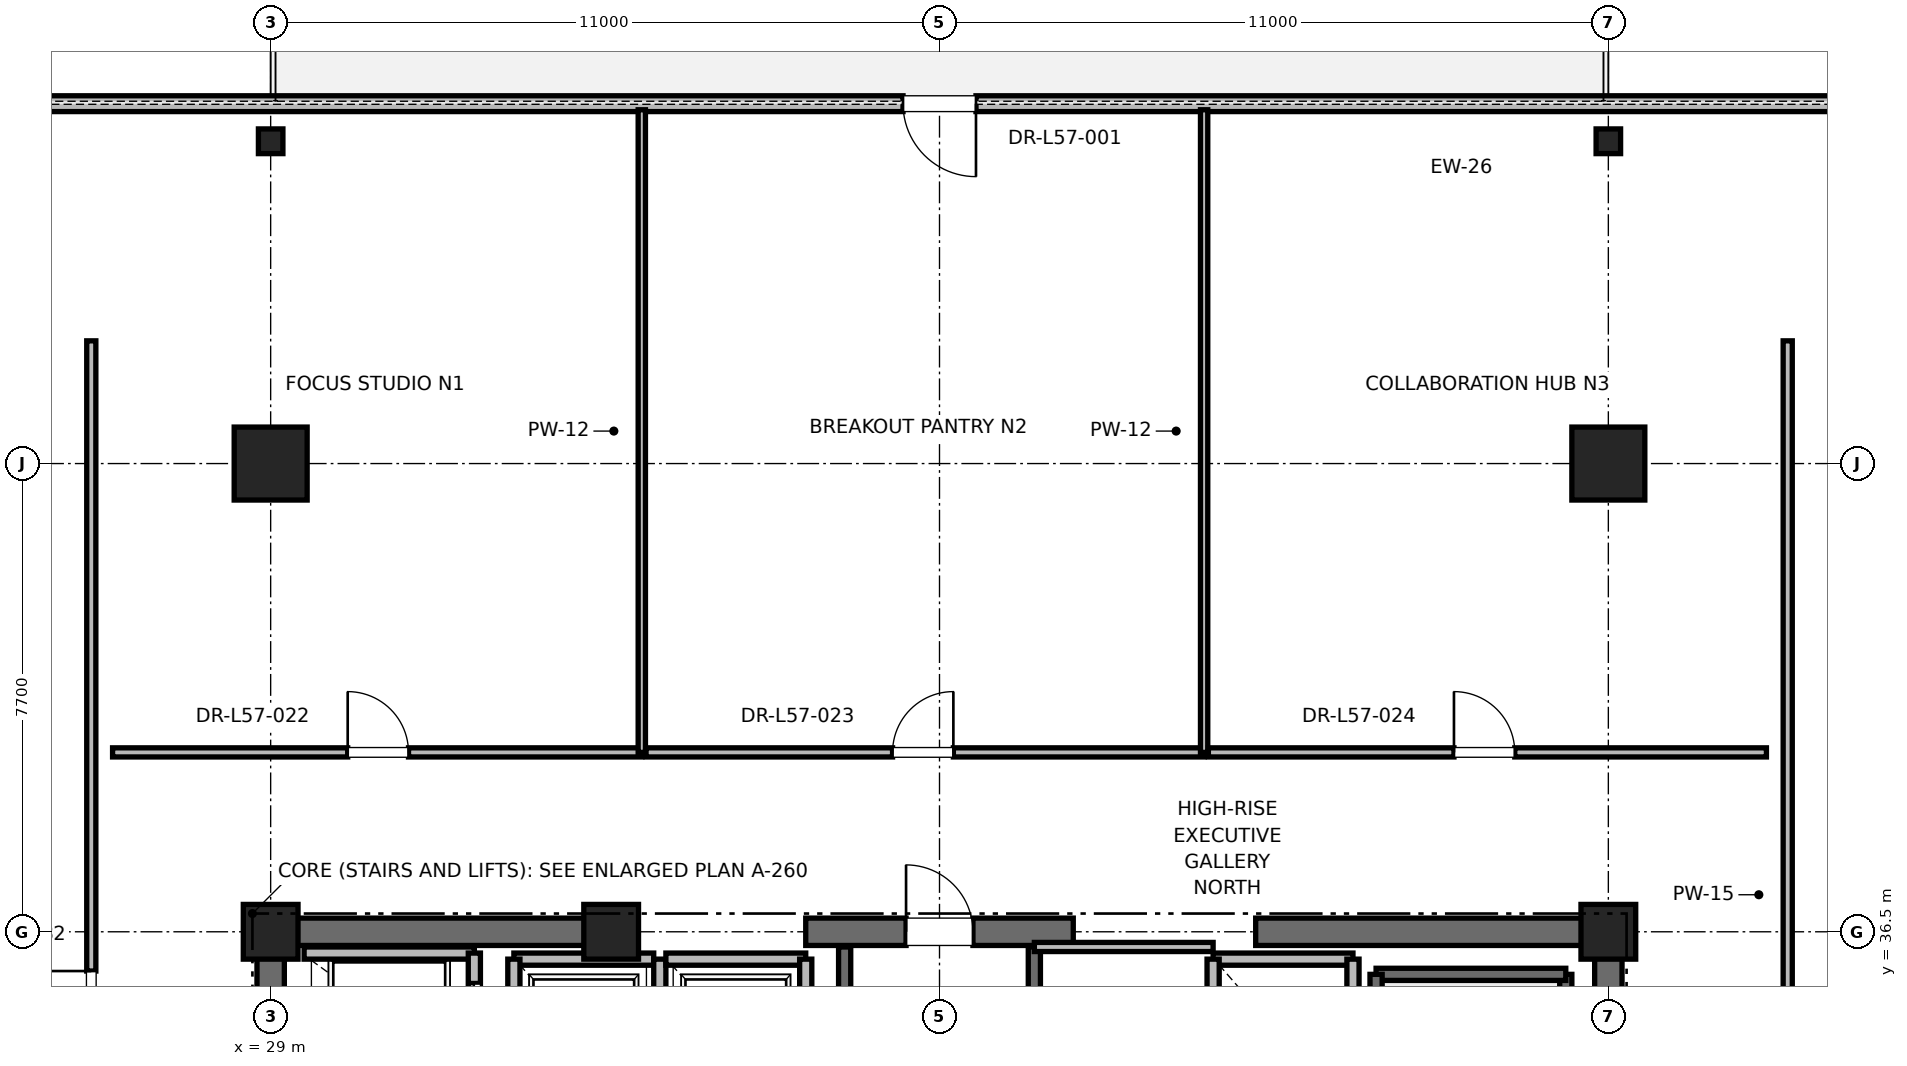
"""IFC4 building model, lengths in metres.
Left out: names, types, materials, properties, quantities, classifications, styles, units other than length and angle.
Written with IfcOpenShell. Run it as: python <this file> out.ifc"""

import sys

from ifc_helpers import new_model, si_unit, direction, frame, frame_2d, origin, origin_2d, place, context, subcontext, project, spatial, rectangle, i_section, extrude, element, fill, save


model = new_model("IFC4")
c1 = context("Model", 3, precision=1e-05, world=origin(), true_north=direction((0.0, 1.0)))
c2 = subcontext(c1, "Body", "Model", "MODEL_VIEW")
j1 = project(units=[si_unit("LENGTHUNIT", "METRE"), si_unit("PLANEANGLEUNIT", "RADIAN")], contexts=[c1])
p1 = place(None, origin())
s1 = spatial("IfcSite", under=j1, at=p1, CompositionType="ELEMENT")
p2 = place(p1, origin())
s2 = spatial("IfcBuilding", under=s1, at=p2, CompositionType="ELEMENT")
p3 = place(p2, frame((0.0, 0.0, 247.2)))
s3 = spatial("IfcBuildingStorey", under=s2, at=p3, CompositionType="ELEMENT", Elevation=247.2)
for number, where, z_axis, x_axis in (
    (1, (29.0, 44.2, 0.0), (0.0, 0.0, 1.0), (1.0, 0.0, 0.0)),
    (2, (51.0, 44.2, 0.0), (0.0, 0.0, 1.0), (1.0, 0.0, 0.0)),
):
    element("IfcColumn", number, at=place(p3, frame(where, z_axis=z_axis, x_axis=x_axis)), inside=s3, PredefinedType="COLUMN", context=c2, shape_type="SweptSolid", body=[
        extrude(rectangle(XDim=1.2, YDim=1.2, at=origin_2d()), origin(), (0.0, 0.0, 1.0), 4.0),
    ])
for number, where, z_axis, x_axis in (
    (3, (29.0, 49.5, 0.0), (0.0, 0.0, 1.0), (1.0, 0.0, 0.0)),
    (4, (51.0, 49.5, 0.0), (0.0, 0.0, 1.0), (1.0, 0.0, 0.0)),
):
    element("IfcColumn", number, at=place(p3, frame(where, z_axis=z_axis, x_axis=x_axis)), inside=s3, PredefinedType="COLUMN", context=c2, shape_type="SweptSolid", body=[
        extrude(i_section(OverallWidth=0.403, OverallDepth=0.406, WebThickness=0.027, FlangeThickness=0.043, FilletRadius=0.015, at=origin_2d()), origin(), (0.0, 0.0, 1.0), 4.0),
    ])
for number, where, z_axis, x_axis in (
    (5, (29.0, 36.5, 0.0), (0.0, 0.0, 1.0), (1.0, 0.0, 0.0)),
    (6, (51.0, 36.5, 0.0), (0.0, 0.0, 1.0), (1.0, 0.0, 0.0)),
    (7, (34.6, 36.5, 0.0), (0.0, 0.0, 1.0), (1.0, 0.0, 0.0)),
):
    element("IfcColumn", number, at=place(p3, frame(where, z_axis=z_axis, x_axis=x_axis)), inside=s3, PredefinedType="PILASTER", context=c2, shape_type="SweptSolid", body=[
        extrude(rectangle(XDim=0.9, YDim=0.9, at=origin_2d()), origin(), (0.0, 0.0, 1.0), 4.0),
    ])
p4 = place(p3, frame((29.0, 36.5, 0.0), z_axis=(0.0, 0.0, 1.0), x_axis=(1.0, 0.0, 0.0)))
e8 = element("IfcWall", 8, at=p4, inside=s3, PredefinedType="SHEAR", context=c2, shape_type="SweptSolid", body=[
    extrude(rectangle(XDim=5.8, YDim=0.45, at=frame_2d((2.9, 0.0))), origin(), (0.0, 0.0, 1.0), 3.785),
])
p5 = place(p3, frame((37.8, 36.5, 0.0), z_axis=(0.0, 0.0, 1.0), x_axis=(1.0, 0.0, 0.0)))
e9 = element("IfcWall", 9, at=p5, inside=s3, PredefinedType="SHEAR", context=c2, shape_type="SweptSolid", body=[
    extrude(rectangle(XDim=4.4, YDim=0.45, at=frame_2d((2.2, 0.0))), origin(), (0.0, 0.0, 1.0), 3.785),
])
p6 = place(p5, frame((1.65, 0.0, 0.0)))
e10 = element("IfcOpeningElement", 10, at=p6, cuts=e9, PredefinedType="OPENING", context=c2, shape_type="SweptSolid", body=[
    extrude(rectangle(XDim=1.1, YDim=2.15, at=frame_2d((0.55, 1.075))), frame((0.0, 0.225, 0.0), z_axis=(0.0, -1.0, 0.0), x_axis=(1.0, 0.0, 0.0)), (0.0, 0.0, 1.0), 0.45),
])
for number, where, z_axis, x_axis in (
    (11, (45.2, 36.5, 0.0), (0.0, 0.0, 1.0), (1.0, 0.0, 0.0)),
    (12, (29.0, 30.7, 0.0), (0.0, 0.0, 1.0), (0.0, 1.0, 0.0)),
):
    element("IfcWall", number, at=place(p3, frame(where, z_axis=z_axis, x_axis=x_axis)), inside=s3, PredefinedType="SHEAR", context=c2, shape_type="SweptSolid", body=[
        extrude(rectangle(XDim=5.8, YDim=0.45, at=frame_2d((2.9, 0.0))), origin(), (0.0, 0.0, 1.0), 3.785),
    ])
p7 = place(p3, frame((51.0, 27.7, 0.0), z_axis=(0.0, 0.0, 1.0), x_axis=(0.0, 1.0, 0.0)))
e13 = element("IfcWall", 13, at=p7, inside=s3, PredefinedType="SHEAR", context=c2, shape_type="SweptSolid", body=[
    extrude(rectangle(XDim=8.8, YDim=0.45, at=frame_2d((4.4, 0.0))), origin(), (0.0, 0.0, 1.0), 3.785),
])
p8 = place(p3, frame((62.366, 50.118, 0.0), z_axis=(0.0, 0.0, 1.0), x_axis=(-1.0, 0.0, 0.0)))
e14 = element("IfcWall", 14, at=p8, inside=s3, PredefinedType="PARAPET", context=c2, shape_type="SweptSolid", body=[
    extrude(rectangle(XDim=44.733, YDim=0.26, at=frame_2d((22.366, 0.0))), origin(), (0.0, 0.0, 1.0), 3.273),
])
p9 = place(p8, frame((4.2, 0.0, 0.85)))
e15 = element("IfcOpeningElement", 15, at=p9, cuts=e14, PredefinedType="OPENING", context=c2, shape_type="SweptSolid", body=[
    extrude(rectangle(XDim=1.6, YDim=2.1, at=frame_2d((0.8, 1.05))), frame((0.0, 0.13, 0.0), z_axis=(0.0, -1.0, 0.0), x_axis=(1.0, 0.0, 0.0)), (0.0, 0.0, 1.0), 0.26),
])
p10 = place(p8, frame((21.767, 0.0, 0.0)))
e16 = element("IfcOpeningElement", 16, at=p10, cuts=e14, PredefinedType="OPENING", context=c2, shape_type="SweptSolid", body=[
    extrude(rectangle(XDim=1.2, YDim=2.2, at=frame_2d((0.6, 1.1))), frame((0.0, 0.13, 0.0), z_axis=(0.0, -1.0, 0.0), x_axis=(1.0, 0.0, 0.0)), (0.0, 0.0, 1.0), 0.26),
])
p11 = place(p8, frame((38.933, 0.0, 0.85)))
e17 = element("IfcOpeningElement", 17, at=p11, cuts=e14, PredefinedType="OPENING", context=c2, shape_type="SweptSolid", body=[
    extrude(rectangle(XDim=1.6, YDim=2.1, at=frame_2d((0.8, 1.05))), frame((0.0, 0.13, 0.0), z_axis=(0.0, -1.0, 0.0), x_axis=(1.0, 0.0, 0.0)), (0.0, 0.0, 1.0), 0.26),
])
p12 = place(p3, frame((50.3, 27.65, 0.0), z_axis=(0.0, 0.0, 1.0), x_axis=(0.0, 1.0, 0.0)))
e18 = element("IfcWall", 18, at=p12, inside=s3, PredefinedType="SOLIDWALL", context=c2, shape_type="SweptSolid", body=[
    extrude(rectangle(XDim=8.15, YDim=0.2, at=frame_2d((4.075, 0.0))), origin(), (0.0, 0.0, 1.0), 3.785),
])
p13 = place(p3, frame((47.18, 35.8, 0.0), z_axis=(0.0, 0.0, 1.0), x_axis=(1.0, 0.0, 0.0)))
e19 = element("IfcWall", 19, at=p13, inside=s3, PredefinedType="SOLIDWALL", context=c2, shape_type="SweptSolid", body=[
    extrude(rectangle(XDim=3.12, YDim=0.2, at=frame_2d((1.56, 0.0))), origin(), (0.0, 0.0, 1.0), 3.785),
])
p14 = place(p3, frame((47.18, 27.62, 0.0), z_axis=(0.0, 0.0, 1.0), x_axis=(0.0, 1.0, 0.0)))
e20 = element("IfcWall", 20, at=p14, inside=s3, PredefinedType="SOLIDWALL", context=c2, shape_type="SweptSolid", body=[
    extrude(rectangle(XDim=8.18, YDim=0.2, at=frame_2d((4.09, 0.0))), origin(), (0.0, 0.0, 1.0), 3.785),
])
p15 = place(p3, frame((38.44, 27.38, 0.0), z_axis=(0.0, 0.0, 1.0), x_axis=(0.0, 1.0, 0.0)))
e21 = element("IfcWall", 21, at=p15, inside=s3, PredefinedType="SOLIDWALL", context=c2, shape_type="SweptSolid", body=[
    extrude(rectangle(XDim=8.87, YDim=0.2, at=frame_2d((4.435, 0.0))), origin(), (0.0, 0.0, 1.0), 3.785),
])
p16 = place(p3, frame((41.56, 27.68, 0.0), z_axis=(0.0, 0.0, 1.0), x_axis=(0.0, 1.0, 0.0)))
e22 = element("IfcWall", 22, at=p16, inside=s3, PredefinedType="SOLIDWALL", context=c2, shape_type="SweptSolid", body=[
    extrude(rectangle(XDim=8.57, YDim=0.2, at=frame_2d((4.285, 0.0))), origin(), (0.0, 0.0, 1.0), 3.785),
])
p17 = place(p3, frame((32.35, 36.15, 0.0), z_axis=(0.0, 0.0, 1.0), x_axis=(-1.0, 0.0, 0.0)))
e23 = element("IfcWall", 23, at=p17, inside=s3, PredefinedType="SOLIDWALL", context=c2, shape_type="SweptSolid", body=[
    extrude(rectangle(XDim=2.8, YDim=0.2, at=frame_2d((1.4, 0.0))), origin(), (0.0, 0.0, 1.0), 3.148),
])
p18 = place(p3, frame((32.35, 34.05, 0.0), z_axis=(0.0, 0.0, 1.0), x_axis=(0.0, 1.0, 0.0)))
e24 = element("IfcWall", 24, at=p18, inside=s3, PredefinedType="SOLIDWALL", context=c2, shape_type="SweptSolid", body=[
    extrude(rectangle(XDim=2.1, YDim=0.2, at=frame_2d((1.05, 0.0))), origin(), (0.0, 0.0, 1.0), 3.785),
])
p19 = place(p18, frame((0.5, 0.0, 0.0)))
e25 = element("IfcOpeningElement", 25, at=p19, cuts=e24, PredefinedType="OPENING", context=c2, shape_type="SweptSolid", body=[
    extrude(rectangle(XDim=1.1, YDim=2.2, at=frame_2d((0.55, 1.1))), frame((0.0, 0.1, 0.0), z_axis=(0.0, -1.0, 0.0), x_axis=(1.0, 0.0, 0.0)), (0.0, 0.0, 1.0), 0.2),
])
p20 = place(p3, frame((35.3, 36.05, 0.0), z_axis=(0.0, 0.0, 1.0), x_axis=(-1.0, 0.0, 0.0)))
e26 = element("IfcWall", 26, at=p20, inside=s3, PredefinedType="SOLIDWALL", context=c2, shape_type="SweptSolid", body=[
    extrude(rectangle(XDim=2.3, YDim=0.2, at=frame_2d((1.15, 0.0))), origin(), (0.0, 0.0, 1.0), 2.865),
])
p21 = place(p3, frame((33.0, 36.05, 0.0), z_axis=(0.0, 0.0, 1.0), x_axis=(0.0, -1.0, 0.0)))
e27 = element("IfcWall", 27, at=p21, inside=s3, PredefinedType="SOLIDWALL", context=c2, shape_type="SweptSolid", body=[
    extrude(rectangle(XDim=2.6, YDim=0.2, at=frame_2d((1.3, 0.0))), origin(), (0.0, 0.0, 1.0), 3.785),
])
p22 = place(p3, frame((35.4, 33.45, 0.0), z_axis=(0.0, 0.0, 1.0), x_axis=(0.0, 1.0, 0.0)))
e28 = element("IfcWall", 28, at=p22, inside=s3, PredefinedType="SOLIDWALL", context=c2, shape_type="SweptSolid", body=[
    extrude(rectangle(XDim=2.6, YDim=0.2, at=frame_2d((1.3, 0.0))), origin(), (0.0, 0.0, 1.0), 2.865),
])
p23 = place(p3, frame((37.8, 36.05, 0.0), z_axis=(0.0, 0.0, 1.0), x_axis=(-1.0, 0.0, 0.0)))
e29 = element("IfcWall", 29, at=p23, inside=s3, PredefinedType="SOLIDWALL", context=c2, shape_type="SweptSolid", body=[
    extrude(rectangle(XDim=2.3, YDim=0.2, at=frame_2d((1.15, 0.0))), origin(), (0.0, 0.0, 1.0), 2.865),
])
p24 = place(p3, frame((37.8, 33.45, 0.0), z_axis=(0.0, 0.0, 1.0), x_axis=(0.0, 1.0, 0.0)))
e30 = element("IfcWall", 30, at=p24, inside=s3, PredefinedType="SOLIDWALL", context=c2, shape_type="SweptSolid", body=[
    extrude(rectangle(XDim=2.6, YDim=0.2, at=frame_2d((1.3, 0.0))), origin(), (0.0, 0.0, 1.0), 2.865),
])
p25 = place(p3, frame((46.8, 36.05, 0.0), z_axis=(0.0, 0.0, 1.0), x_axis=(-1.0, 0.0, 0.0)))
e31 = element("IfcWall", 31, at=p25, inside=s3, PredefinedType="SOLIDWALL", context=c2, shape_type="SweptSolid", body=[
    extrude(rectangle(XDim=2.3, YDim=0.2, at=frame_2d((1.15, 0.0))), origin(), (0.0, 0.0, 1.0), 2.865),
])
p26 = place(p3, frame((44.5, 36.05, 0.0), z_axis=(0.0, 0.0, 1.0), x_axis=(0.0, -1.0, 0.0)))
e32 = element("IfcWall", 32, at=p26, inside=s3, PredefinedType="SOLIDWALL", context=c2, shape_type="SweptSolid", body=[
    extrude(rectangle(XDim=2.6, YDim=0.2, at=frame_2d((1.3, 0.0))), origin(), (0.0, 0.0, 1.0), 2.865),
])
p27 = place(p3, frame((46.8, 33.45, 0.0), z_axis=(0.0, 0.0, 1.0), x_axis=(0.0, 1.0, 0.0)))
e33 = element("IfcWall", 33, at=p27, inside=s3, PredefinedType="SOLIDWALL", context=c2, shape_type="SweptSolid", body=[
    extrude(rectangle(XDim=2.6, YDim=0.2, at=frame_2d((1.3, 0.0))), origin(), (0.0, 0.0, 1.0), 3.785),
])
p28 = place(p3, frame((41.56, 36.25, 0.0), z_axis=(0.0, 0.0, 1.0), x_axis=(1.0, 0.0, 0.0)))
e34 = element("IfcWall", 34, at=p28, inside=s3, PredefinedType="PARTITIONING", context=c2, shape_type="SweptSolid", body=[
    extrude(rectangle(XDim=2.94, YDim=0.15, at=frame_2d((1.47, 0.0))), origin(), (0.0, 0.0, 1.0), 2.85),
])
p29 = place(p3, frame((26.4, 39.45, 0.0), z_axis=(0.0, 0.0, 1.0), x_axis=(1.0, 0.0, 0.0)))
e35 = element("IfcWall", 35, at=p29, inside=s3, PredefinedType="PARTITIONING", context=c2, shape_type="SweptSolid", body=[
    extrude(rectangle(XDim=8.704, YDim=0.15, at=frame_2d((4.352, 0.0))), origin(), (0.0, 0.0, 1.0), 2.85),
])
p30 = place(p29, frame((3.867, 0.0, 0.0)))
e36 = element("IfcOpeningElement", 36, at=p30, cuts=e35, PredefinedType="OPENING", context=c2, shape_type="SweptSolid", body=[
    extrude(rectangle(XDim=1.0, YDim=2.15, at=frame_2d((0.5, 1.075))), frame((0.0, 0.075, 0.0), z_axis=(0.0, -1.0, 0.0), x_axis=(1.0, 0.0, 0.0)), (0.0, 0.0, 1.0), 0.15),
])
p31 = place(p3, frame((35.104, 39.45, 0.0), z_axis=(0.0, 0.0, 1.0), x_axis=(0.0, 1.0, 0.0)))
e37 = element("IfcWall", 37, at=p31, inside=s3, PredefinedType="PARTITIONING", context=c2, shape_type="SweptSolid", body=[
    extrude(rectangle(XDim=10.568, YDim=0.12, at=frame_2d((5.284, 0.0))), origin(), (0.0, 0.0, 1.0), 2.415),
])
p32 = place(p3, frame((35.174, 39.45, 0.0), z_axis=(0.0, 0.0, 1.0), x_axis=(1.0, 0.0, 0.0)))
e38 = element("IfcWall", 38, at=p32, inside=s3, PredefinedType="PARTITIONING", context=c2, shape_type="SweptSolid", body=[
    extrude(rectangle(XDim=9.178, YDim=0.15, at=frame_2d((4.589, 0.0))), origin(), (0.0, 0.0, 1.0), 2.85),
])
p33 = place(p32, frame((4.054, 0.0, 0.0)))
e39 = element("IfcOpeningElement", 39, at=p33, cuts=e38, PredefinedType="OPENING", context=c2, shape_type="SweptSolid", body=[
    extrude(rectangle(XDim=1.0, YDim=2.15, at=frame_2d((0.5, 1.075))), frame((0.0, 0.075, 0.0), z_axis=(0.0, -1.0, 0.0), x_axis=(1.0, 0.0, 0.0)), (0.0, 0.0, 1.0), 0.15),
])
p34 = place(p3, frame((44.352, 39.45, 0.0), z_axis=(0.0, 0.0, 1.0), x_axis=(0.0, 1.0, 0.0)))
e40 = element("IfcWall", 40, at=p34, inside=s3, PredefinedType="PARTITIONING", context=c2, shape_type="SweptSolid", body=[
    extrude(rectangle(XDim=10.568, YDim=0.12, at=frame_2d((5.284, 0.0))), origin(), (0.0, 0.0, 1.0), 2.415),
])
p35 = place(p3, frame((44.422, 39.45, 0.0), z_axis=(0.0, 0.0, 1.0), x_axis=(1.0, 0.0, 0.0)))
e41 = element("IfcWall", 41, at=p35, inside=s3, PredefinedType="PARTITIONING", context=c2, shape_type="SweptSolid", body=[
    extrude(rectangle(XDim=9.178, YDim=0.15, at=frame_2d((4.589, 0.0))), origin(), (0.0, 0.0, 1.0), 2.85),
])
p36 = place(p35, frame((4.039, 0.0, 0.0)))
e42 = element("IfcOpeningElement", 42, at=p36, cuts=e41, PredefinedType="OPENING", context=c2, shape_type="SweptSolid", body=[
    extrude(rectangle(XDim=1.0, YDim=2.15, at=frame_2d((0.5, 1.075))), frame((0.0, 0.075, 0.0), z_axis=(0.0, -1.0, 0.0), x_axis=(1.0, 0.0, 0.0)), (0.0, 0.0, 1.0), 0.15),
])
p37 = place(p3, frame((26.05, 34.309, 0.0), z_axis=(0.0, 0.0, 1.0), x_axis=(0.0, 1.0, 0.0)))
e43 = element("IfcWall", 43, at=p37, inside=s3, PredefinedType="PARTITIONING", context=c2, shape_type="SweptSolid", body=[
    extrude(rectangle(XDim=11.91, YDim=0.15, at=frame_2d((5.955, 0.0))), origin(), (0.0, 0.0, 1.0), 2.85),
])
p38 = place(p37, frame((0.546, 0.0, 0.0)))
e44 = element("IfcOpeningElement", 44, at=p38, cuts=e43, PredefinedType="OPENING", context=c2, shape_type="SweptSolid", body=[
    extrude(rectangle(XDim=1.0, YDim=2.15, at=frame_2d((0.5, 1.075))), frame((0.0, 0.075, 0.0), z_axis=(0.0, -1.0, 0.0), x_axis=(1.0, 0.0, 0.0)), (0.0, 0.0, 1.0), 0.15),
])
p39 = place(p3, frame((53.95, 8.782, 0.0), z_axis=(0.0, 0.0, 1.0), x_axis=(0.0, 1.0, 0.0)))
e45 = element("IfcWall", 45, at=p39, inside=s3, PredefinedType="PARTITIONING", context=c2, shape_type="SweptSolid", body=[
    extrude(rectangle(XDim=37.437, YDim=0.15, at=frame_2d((18.718, 0.0))), origin(), (0.0, 0.0, 1.0), 2.85),
])
p40 = place(p39, frame((18.218, 0.0, 0.0)))
e46 = element("IfcOpeningElement", 46, at=p40, cuts=e45, PredefinedType="OPENING", context=c2, shape_type="SweptSolid", body=[
    extrude(rectangle(XDim=1.0, YDim=2.15, at=frame_2d((0.5, 1.075))), frame((0.0, 0.075, 0.0), z_axis=(0.0, -1.0, 0.0), x_axis=(1.0, 0.0, 0.0)), (0.0, 0.0, 1.0), 0.15),
])
p41 = place(p10, origin())
e47 = element("IfcDoor", 47, at=p41, inside=s3, OperationType="SINGLE_SWING_LEFT", PredefinedType="DOOR", context=c2, shape_type="SweptSolid", body=[
    extrude(rectangle(XDim=1.2, YDim=2.2, at=frame_2d((0.6, 1.1))), frame((0.0, 0.025, 0.0), z_axis=(0.0, -1.0, 0.0), x_axis=(1.0, 0.0, 0.0)), (0.0, 0.0, 1.0), 0.05),
])
fill(e16, e47)
p42 = place(p6, origin())
e48 = element("IfcDoor", 48, at=p42, inside=s3, OperationType="SINGLE_SWING_LEFT", PredefinedType="DOOR", context=c2, shape_type="SweptSolid", body=[
    extrude(rectangle(XDim=1.1, YDim=2.15, at=frame_2d((0.55, 1.075))), frame((0.0, 0.025, 0.0), z_axis=(0.0, -1.0, 0.0), x_axis=(1.0, 0.0, 0.0)), (0.0, 0.0, 1.0), 0.05),
])
fill(e10, e48)
p43 = place(p19, origin())
e49 = element("IfcDoor", 49, at=p43, inside=s3, OperationType="SLIDING_TO_RIGHT", PredefinedType="DOOR", context=c2, shape_type="SweptSolid", body=[
    extrude(rectangle(XDim=1.1, YDim=2.2, at=frame_2d((0.55, 1.1))), frame((0.0, 0.025, 0.0), z_axis=(0.0, -1.0, 0.0), x_axis=(1.0, 0.0, 0.0)), (0.0, 0.0, 1.0), 0.05),
])
fill(e25, e49)
p44 = place(p30, origin())
e50 = element("IfcDoor", 50, at=p44, inside=s3, OperationType="SINGLE_SWING_LEFT", PredefinedType="DOOR", context=c2, shape_type="SweptSolid", body=[
    extrude(rectangle(XDim=1.0, YDim=2.15, at=frame_2d((0.5, 1.075))), frame((0.0, 0.025, 0.0), z_axis=(0.0, -1.0, 0.0), x_axis=(1.0, 0.0, 0.0)), (0.0, 0.0, 1.0), 0.05),
])
fill(e36, e50)
p45 = place(p33, origin())
e51 = element("IfcDoor", 51, at=p45, inside=s3, OperationType="SINGLE_SWING_RIGHT", PredefinedType="DOOR", context=c2, shape_type="SweptSolid", body=[
    extrude(rectangle(XDim=1.0, YDim=2.15, at=frame_2d((0.5, 1.075))), frame((0.0, 0.025, 0.0), z_axis=(0.0, -1.0, 0.0), x_axis=(1.0, 0.0, 0.0)), (0.0, 0.0, 1.0), 0.05),
])
fill(e39, e51)
p46 = place(p36, origin())
e52 = element("IfcDoor", 52, at=p46, inside=s3, OperationType="SINGLE_SWING_LEFT", PredefinedType="DOOR", context=c2, shape_type="SweptSolid", body=[
    extrude(rectangle(XDim=1.0, YDim=2.15, at=frame_2d((0.5, 1.075))), frame((0.0, 0.025, 0.0), z_axis=(0.0, -1.0, 0.0), x_axis=(1.0, 0.0, 0.0)), (0.0, 0.0, 1.0), 0.05),
])
fill(e42, e52)
p47 = place(p38, origin())
e53 = element("IfcDoor", 53, at=p47, inside=s3, OperationType="SINGLE_SWING_RIGHT", PredefinedType="DOOR", context=c2, shape_type="SweptSolid", body=[
    extrude(rectangle(XDim=1.0, YDim=2.15, at=frame_2d((0.5, 1.075))), frame((0.0, 0.025, 0.0), z_axis=(0.0, -1.0, 0.0), x_axis=(1.0, 0.0, 0.0)), (0.0, 0.0, 1.0), 0.05),
])
fill(e44, e53)
save(model, sys.argv[1])
